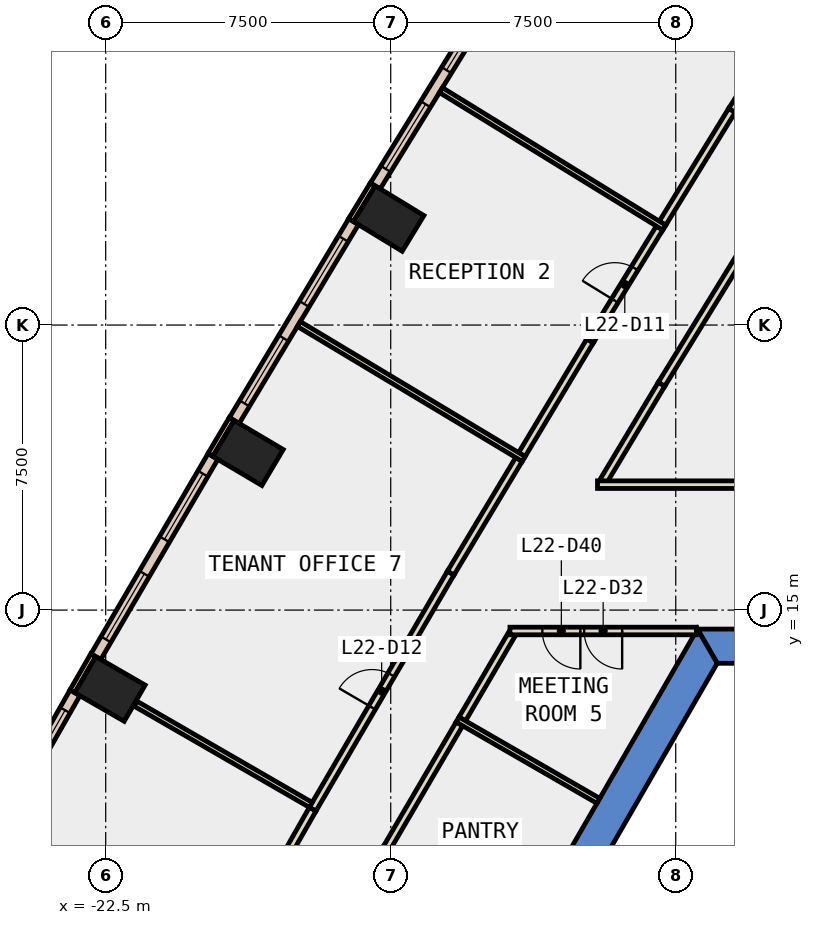
"""IFC4 building model, lengths in metres.
Left out: names, types, materials, properties, quantities, classifications, styles, units other than length and angle.
Written with IfcOpenShell. Run it as: python <this file> out.ifc"""

import sys

from ifc_helpers import new_model, si_unit, direction, frame, frame_2d, origin, origin_2d, place, context, subcontext, project, spatial, polyline, rectangle, outline, extrude, element, fill, save


model = new_model("IFC4")
c1 = context("Model", 3, precision=1e-05, world=origin(), true_north=direction((0.0, 1.0)))
c2 = subcontext(c1, "Body", "Model", "MODEL_VIEW")
j1 = project(units=[si_unit("LENGTHUNIT", "METRE"), si_unit("PLANEANGLEUNIT", "RADIAN")], contexts=[c1])
p1 = place(None, origin())
s1 = spatial("IfcSite", under=j1, at=p1, CompositionType="ELEMENT")
p2 = place(p1, origin())
s2 = spatial("IfcBuilding", under=s1, at=p2, CompositionType="ELEMENT")
p3 = place(p2, frame((0.0, 0.0, 103.4)))
s3 = spatial("IfcBuildingStorey", under=s2, at=p3, CompositionType="ELEMENT", Elevation=103.4)
for number, where, z_axis, x_axis in (
    (1, (-15.053, 25.302, -0.4), (0.0, 0.0, 1.0), (0.52, 0.854, 0.0)),
    (2, (-18.755, 19.134, -0.4), (0.0, 0.0, 1.0), (0.51, 0.86, 0.0)),
    (3, (-22.387, 12.925, -0.4), (0.0, 0.0, 1.0), (0.5, 0.866, 0.0)),
):
    element("IfcColumn", number, at=place(p3, frame(where, z_axis=z_axis, x_axis=x_axis)), inside=s3, PredefinedType="COLUMN", context=c2, shape_type="SweptSolid", body=[
        extrude(rectangle(XDim=1.1, YDim=1.5, at=origin_2d()), origin(), (0.0, 0.0, 1.0), 4.2),
    ])
p4 = place(p3, frame((0.0, 0.0, -0.4)))
e4 = element("IfcWall", 4, at=p4, inside=s3, PredefinedType="SHEAR", context=c2, shape_type="SweptSolid", body=[
    extrude(outline(polyline([(-4.55, 13.6), (-4.55, 14.5), (-6.928, 14.5), (-6.409, 13.6), (-4.55, 13.6)])), origin(), (0.0, 0.0, 1.0), 4.2),
])
p5 = place(p3, frame((0.0, 0.0, -0.4)))
e5 = element("IfcWall", 5, at=p5, inside=s3, PredefinedType="SHEAR", context=c2, shape_type="SweptSolid", body=[
    extrude(outline(polyline([(-12.267, 5.252), (-11.488, 4.802), (-6.409, 13.6), (-6.928, 14.5), (-12.267, 5.252)])), origin(), (0.0, 0.0, 1.0), 4.2),
])
p6 = place(p3, frame((-15.472, 26.201, 0.0), z_axis=(0.0, 0.0, 1.0), x_axis=(-0.519869515594, -0.854245682901, 0.0)))
e6 = element("IfcWall", 6, at=p6, inside=s3, PredefinedType="STANDARD", context=c2, shape_type="SweptSolid", body=[
    extrude(rectangle(XDim=1.1, YDim=0.15, at=frame_2d((0.55, 0.0))), origin(), (0.0, 0.0, 1.0), 3.8),
])
p7 = place(p3, frame((-19.184, 20.028, 0.0), z_axis=(0.0, 0.0, 1.0), x_axis=(-0.510082245696, -0.860125631885, 0.0)))
e7 = element("IfcWall", 7, at=p7, inside=s3, PredefinedType="STANDARD", context=c2, shape_type="SweptSolid", body=[
    extrude(rectangle(XDim=1.1, YDim=0.15, at=frame_2d((0.55, 0.0))), origin(), (0.0, 0.0, 1.0), 3.8),
])
p8 = place(p3, frame((-22.826, 13.814, 0.0), z_axis=(0.0, 0.0, 1.0), x_axis=(-0.499933745558, -0.866063652425, 0.0)))
e8 = element("IfcWall", 8, at=p8, inside=s3, PredefinedType="STANDARD", context=c2, shape_type="SweptSolid", body=[
    extrude(rectangle(XDim=1.1, YDim=0.15, at=frame_2d((0.55, 0.0))), origin(), (0.0, 0.0, 1.0), 3.8),
])
p9 = place(p3, frame((-12.207, 31.358, 0.0), z_axis=(0.0, 0.0, 1.0), x_axis=(-0.524121974895, -0.851643208998, 0.0)))
e9 = element("IfcWall", 9, at=p9, inside=s3, PredefinedType="STANDARD", context=c2, shape_type="SweptSolid", body=[
    extrude(rectangle(XDim=6.104, YDim=0.3, at=frame_2d((3.052, 0.0))), origin(), (0.0, 0.0, 1.0), 3.8),
])
p10 = place(p9, frame((0.526, 0.0, 0.9)))
e10 = element("IfcOpeningElement", 10, at=p10, cuts=e9, PredefinedType="OPENING", context=c2, shape_type="SweptSolid", body=[
    extrude(rectangle(XDim=2.0, YDim=2.6, at=frame_2d((1.0, 1.3))), frame((0.0, 0.16, 0.0), z_axis=(0.0, -1.0, 0.0), x_axis=(1.0, 0.0, 0.0)), (0.0, 0.0, 1.0), 0.32),
])
p11 = place(p9, frame((3.578, 0.0, 0.9)))
e11 = element("IfcOpeningElement", 11, at=p11, cuts=e9, PredefinedType="OPENING", context=c2, shape_type="SweptSolid", body=[
    extrude(rectangle(XDim=2.0, YDim=2.6, at=frame_2d((1.0, 1.3))), frame((0.0, 0.16, 0.0), z_axis=(0.0, -1.0, 0.0), x_axis=(1.0, 0.0, 0.0)), (0.0, 0.0, 1.0), 0.32),
])
p12 = place(p3, frame((-15.976, 25.221, 0.0), z_axis=(0.0, 0.0, 1.0), x_axis=(-0.514560454873, -0.857454102726, 0.0)))
e12 = element("IfcWall", 12, at=p12, inside=s3, PredefinedType="STANDARD", context=c2, shape_type="SweptSolid", body=[
    extrude(rectangle(XDim=6.104, YDim=0.3, at=frame_2d((3.052, 0.0))), origin(), (0.0, 0.0, 1.0), 3.8),
])
p13 = place(p12, frame((0.526, 0.0, 0.9)))
e13 = element("IfcOpeningElement", 13, at=p13, cuts=e12, PredefinedType="OPENING", context=c2, shape_type="SweptSolid", body=[
    extrude(rectangle(XDim=2.0, YDim=2.6, at=frame_2d((1.0, 1.3))), frame((0.0, 0.16, 0.0), z_axis=(0.0, -1.0, 0.0), x_axis=(1.0, 0.0, 0.0)), (0.0, 0.0, 1.0), 0.32),
])
p14 = place(p12, frame((3.578, 0.0, 0.9)))
e14 = element("IfcOpeningElement", 14, at=p14, cuts=e12, PredefinedType="OPENING", context=c2, shape_type="SweptSolid", body=[
    extrude(rectangle(XDim=2.0, YDim=2.6, at=frame_2d((1.0, 1.3))), frame((0.0, 0.16, 0.0), z_axis=(0.0, -1.0, 0.0), x_axis=(1.0, 0.0, 0.0)), (0.0, 0.0, 1.0), 0.32),
])
p15 = place(p3, frame((-19.677, 19.043, 0.0), z_axis=(0.0, 0.0, 1.0), x_axis=(-0.50490018297, -0.863177736759, 0.0)))
e15 = element("IfcWall", 15, at=p15, inside=s3, PredefinedType="STANDARD", context=c2, shape_type="SweptSolid", body=[
    extrude(rectangle(XDim=6.104, YDim=0.3, at=frame_2d((3.052, 0.0))), origin(), (0.0, 0.0, 1.0), 3.8),
])
p16 = place(p15, frame((0.526, 0.0, 0.9)))
e16 = element("IfcOpeningElement", 16, at=p16, cuts=e15, PredefinedType="OPENING", context=c2, shape_type="SweptSolid", body=[
    extrude(rectangle(XDim=2.0, YDim=2.6, at=frame_2d((1.0, 1.3))), frame((0.0, 0.16, 0.0), z_axis=(0.0, -1.0, 0.0), x_axis=(1.0, 0.0, 0.0)), (0.0, 0.0, 1.0), 0.32),
])
p17 = place(p15, frame((3.578, 0.0, 0.9)))
e17 = element("IfcOpeningElement", 17, at=p17, cuts=e15, PredefinedType="OPENING", context=c2, shape_type="SweptSolid", body=[
    extrude(rectangle(XDim=2.0, YDim=2.6, at=frame_2d((1.0, 1.3))), frame((0.0, 0.16, 0.0), z_axis=(0.0, -1.0, 0.0), x_axis=(1.0, 0.0, 0.0)), (0.0, 0.0, 1.0), 0.32),
])
p18 = place(p3, frame((-23.308, 12.823, 0.0), z_axis=(0.0, 0.0, 1.0), x_axis=(-0.495113375427, -0.868828375154, 0.0)))
e18 = element("IfcWall", 18, at=p18, inside=s3, PredefinedType="STANDARD", context=c2, shape_type="SweptSolid", body=[
    extrude(rectangle(XDim=6.104, YDim=0.3, at=frame_2d((3.052, 0.0))), origin(), (0.0, 0.0, 1.0), 3.8),
])
p19 = place(p18, frame((0.526, 0.0, 0.9)))
e19 = element("IfcOpeningElement", 19, at=p19, cuts=e18, PredefinedType="OPENING", context=c2, shape_type="SweptSolid", body=[
    extrude(rectangle(XDim=2.0, YDim=2.6, at=frame_2d((1.0, 1.3))), frame((0.0, 0.16, 0.0), z_axis=(0.0, -1.0, 0.0), x_axis=(1.0, 0.0, 0.0)), (0.0, 0.0, 1.0), 0.32),
])
p20 = place(p18, frame((3.578, 0.0, 0.9)))
e20 = element("IfcOpeningElement", 20, at=p20, cuts=e18, PredefinedType="OPENING", context=c2, shape_type="SweptSolid", body=[
    extrude(rectangle(XDim=2.0, YDim=2.6, at=frame_2d((1.0, 1.3))), frame((0.0, 0.16, 0.0), z_axis=(0.0, -1.0, 0.0), x_axis=(1.0, 0.0, 0.0)), (0.0, 0.0, 1.0), 0.32),
])
p21 = place(p3, frame((-11.814, 14.364, 0.0), z_axis=(0.0, 0.0, 1.0), x_axis=(-0.504658640018, -0.863318977583, 0.0)))
e21 = element("IfcWall", 21, at=p21, inside=s3, PredefinedType="PARTITIONING", context=c2, shape_type="SweptSolid", body=[
    extrude(rectangle(XDim=2.582, YDim=0.2, at=frame_2d((1.291, 0.0))), origin(), (0.0, 0.0, 1.0), 3.8),
])
p22 = place(p3, frame((-13.193, 12.005, 0.0), z_axis=(0.0, 0.0, 1.0), x_axis=(-0.50499711829, -0.863121028894, 0.0)))
e22 = element("IfcWall", 22, at=p22, inside=s3, PredefinedType="PARTITIONING", context=c2, shape_type="SweptSolid", body=[
    extrude(rectangle(XDim=3.8, YDim=0.2, at=frame_2d((1.9, 0.0))), origin(), (0.0, 0.0, 1.0), 3.8),
])
p23 = place(p3, frame((-4.154, 26.985, 0.0), z_axis=(0.0, 0.0, 1.0), x_axis=(-0.524183774504, -0.851605172921, 0.0)))
e23 = element("IfcWall", 23, at=p23, inside=s3, PredefinedType="PARTITIONING", context=c2, shape_type="SweptSolid", body=[
    extrude(rectangle(XDim=7.099, YDim=0.2, at=frame_2d((3.549, 0.0))), origin(), (0.0, 0.0, 1.0), 3.8),
])
p24 = place(p3, frame((-7.875, 20.94, 0.0), z_axis=(0.0, 0.0, 1.0), x_axis=(-0.514399309837, -0.857550785691, 0.0)))
e24 = element("IfcWall", 24, at=p24, inside=s3, PredefinedType="PARTITIONING", context=c2, shape_type="SweptSolid", body=[
    extrude(rectangle(XDim=2.978, YDim=0.2, at=frame_2d((1.489, 0.0))), origin(), (0.0, 0.0, 1.0), 3.8),
])
p25 = place(p3, frame((-7.848, 25.18, 0.0), z_axis=(0.0, 0.0, 1.0), x_axis=(0.524062258075, 0.851679957297, 0.0)))
e25 = element("IfcWall", 25, at=p25, inside=s3, PredefinedType="PARTITIONING", context=c2, shape_type="SweptSolid", body=[
    extrude(rectangle(XDim=3.486, YDim=0.2, at=frame_2d((1.743, 0.0))), origin(), (0.0, 0.0, 1.0), 3.8),
])
p26 = place(p3, frame((-6.021, 28.149, 0.0), z_axis=(0.0, 0.0, 1.0), x_axis=(0.533874165031, 0.845563939577, 0.0)))
e26 = element("IfcWall", 26, at=p26, inside=s3, PredefinedType="PARTITIONING", context=c2, shape_type="SweptSolid", body=[
    extrude(rectangle(XDim=6.571, YDim=0.2, at=frame_2d((3.286, 0.0))), origin(), (0.0, 0.0, 1.0), 3.8),
])
p27 = place(p26, frame((2.785, 0.0, 0.0)))
e27 = element("IfcOpeningElement", 27, at=p27, cuts=e26, PredefinedType="OPENING", context=c2, shape_type="SweptSolid", body=[
    extrude(rectangle(XDim=1.0, YDim=2.1, at=frame_2d((0.5, 1.05))), frame((0.0, 0.11, 0.0), z_axis=(0.0, -1.0, 0.0), x_axis=(1.0, 0.0, 0.0)), (0.0, 0.0, 1.0), 0.22),
])
p28 = place(p3, frame((-11.549, 19.092, 0.0), z_axis=(0.0, 0.0, 1.0), x_axis=(0.514536939864, 0.857468213705, 0.0)))
e28 = element("IfcWall", 28, at=p28, inside=s3, PredefinedType="PARTITIONING", context=c2, shape_type="SweptSolid", body=[
    extrude(rectangle(XDim=3.487, YDim=0.2, at=frame_2d((1.744, 0.0))), origin(), (0.0, 0.0, 1.0), 3.8),
])
p29 = place(p3, frame((-9.755, 22.082, 0.0), z_axis=(0.0, 0.0, 1.0), x_axis=(0.524140390501, 0.851631875311, 0.0)))
e29 = element("IfcWall", 29, at=p29, inside=s3, PredefinedType="PARTITIONING", context=c2, shape_type="SweptSolid", body=[
    extrude(rectangle(XDim=3.487, YDim=0.2, at=frame_2d((1.744, 0.0))), origin(), (0.0, 0.0, 1.0), 3.8),
])
p30 = place(p29, frame((1.244, 0.0, 0.0)))
e30 = element("IfcOpeningElement", 30, at=p30, cuts=e29, PredefinedType="OPENING", context=c2, shape_type="SweptSolid", body=[
    extrude(rectangle(XDim=1.0, YDim=2.1, at=frame_2d((0.5, 1.05))), frame((0.0, 0.11, 0.0), z_axis=(0.0, -1.0, 0.0), x_axis=(1.0, 0.0, 0.0)), (0.0, 0.0, 1.0), 0.22),
])
p31 = place(p3, frame((-17.055, 9.76, 0.0), z_axis=(0.0, 0.0, 1.0), x_axis=(0.504817517618, 0.863226085047, 0.0)))
e31 = element("IfcWall", 31, at=p31, inside=s3, PredefinedType="PARTITIONING", context=c2, shape_type="SweptSolid", body=[
    extrude(rectangle(XDim=7.199, YDim=0.2, at=frame_2d((3.599, 0.0))), origin(), (0.0, 0.0, 1.0), 3.8),
])
p32 = place(p31, frame((3.099, 0.0, 0.0)))
e32 = element("IfcOpeningElement", 32, at=p32, cuts=e31, PredefinedType="OPENING", context=c2, shape_type="SweptSolid", body=[
    extrude(rectangle(XDim=1.0, YDim=2.1, at=frame_2d((0.5, 1.05))), frame((0.0, 0.11, 0.0), z_axis=(0.0, -1.0, 0.0), x_axis=(1.0, 0.0, 0.0)), (0.0, 0.0, 1.0), 0.22),
])
p33 = place(p3, frame((-13.421, 15.974, 0.0), z_axis=(0.0, 0.0, 1.0), x_axis=(0.514691349792, 0.857375538751, 0.0)))
e33 = element("IfcWall", 33, at=p33, inside=s3, PredefinedType="PARTITIONING", context=c2, shape_type="SweptSolid", body=[
    extrude(rectangle(XDim=3.487, YDim=0.2, at=frame_2d((1.744, 0.0))), origin(), (0.0, 0.0, 1.0), 3.8),
])
p34 = place(p3, frame((-20.581, 3.571, 0.0), z_axis=(0.0, 0.0, 1.0), x_axis=(0.495138372197, 0.868814129937, 0.0)))
e34 = element("IfcWall", 34, at=p34, inside=s3, PredefinedType="PARTITIONING", context=c2, shape_type="SweptSolid", body=[
    extrude(rectangle(XDim=7.124, YDim=0.2, at=frame_2d((3.562, 0.0))), origin(), (0.0, 0.0, 1.0), 3.8),
])
p35 = place(p34, frame((3.137, 0.0, 0.0)))
e35 = element("IfcOpeningElement", 35, at=p35, cuts=e34, PredefinedType="OPENING", context=c2, shape_type="SweptSolid", body=[
    extrude(rectangle(XDim=1.0, YDim=2.1, at=frame_2d((0.5, 1.05))), frame((0.0, 0.11, 0.0), z_axis=(0.0, -1.0, 0.0), x_axis=(1.0, 0.0, 0.0)), (0.0, 0.0, 1.0), 0.22),
])
p36 = place(p3, frame((-9.537, 9.981, 0.0), z_axis=(0.0, 0.0, 1.0), x_axis=(-0.866007866579, 0.5000303741, 0.0)))
e36 = element("IfcWall", 36, at=p36, inside=s3, PredefinedType="PARTITIONING", context=c2, shape_type="SweptSolid", body=[
    extrude(rectangle(XDim=4.278, YDim=0.15, at=frame_2d((2.139, 0.0))), origin(), (0.0, 0.0, 1.0), 3.8),
])
p37 = place(p3, frame((-6.957, 14.45, 0.0), z_axis=(0.0, 0.0, 1.0), x_axis=(-1.0, 0.0, 0.0)))
e37 = element("IfcWall", 37, at=p37, inside=s3, PredefinedType="PARTITIONING", context=c2, shape_type="SweptSolid", body=[
    extrude(rectangle(XDim=4.906, YDim=0.2, at=frame_2d((2.453, 0.0))), origin(), (0.0, 0.0, 1.0), 3.8),
])
p38 = place(p37, frame((1.953, 0.0, 0.0)))
e38 = element("IfcOpeningElement", 38, at=p38, cuts=e37, PredefinedType="OPENING", context=c2, shape_type="SweptSolid", body=[
    extrude(rectangle(XDim=1.0, YDim=2.1, at=frame_2d((0.5, 1.05))), frame((0.0, 0.11, 0.0), z_axis=(0.0, -1.0, 0.0), x_axis=(1.0, 0.0, 0.0)), (0.0, 0.0, 1.0), 0.22),
])
p39 = place(p37, frame((3.053, 0.0, 0.0)))
e39 = element("IfcOpeningElement", 39, at=p39, cuts=e37, PredefinedType="OPENING", context=c2, shape_type="SweptSolid", body=[
    extrude(rectangle(XDim=1.0, YDim=2.1, at=frame_2d((0.5, 1.05))), frame((0.0, 0.11, 0.0), z_axis=(0.0, -1.0, 0.0), x_axis=(1.0, 0.0, 0.0)), (0.0, 0.0, 1.0), 0.22),
])
p40 = place(p3, frame((-9.559, 18.3, 0.0), z_axis=(0.0, 0.0, 1.0), x_axis=(1.0, 0.0, 0.0)))
e40 = element("IfcWall", 40, at=p40, inside=s3, PredefinedType="PARTITIONING", context=c2, shape_type="SweptSolid", body=[
    extrude(rectangle(XDim=9.159, YDim=0.2, at=frame_2d((4.58, 0.0))), origin(), (0.0, 0.0, 1.0), 3.8),
])
p41 = place(p3, frame((-7.802, 25.064, 0.0), z_axis=(0.0, 0.0, 1.0), x_axis=(-0.851596352662, 0.524198103901, 0.0)))
e41 = element("IfcWall", 41, at=p41, inside=s3, PredefinedType="PARTITIONING", context=c2, shape_type="SweptSolid", body=[
    extrude(rectangle(XDim=6.9, YDim=0.15, at=frame_2d((3.45, 0.0))), origin(), (0.0, 0.0, 1.0), 3.8),
])
p42 = place(p3, frame((-11.502, 18.977, 0.0), z_axis=(0.0, 0.0, 1.0), x_axis=(-0.857464824073, 0.514542588595, 0.0)))
e42 = element("IfcWall", 42, at=p42, inside=s3, PredefinedType="PARTITIONING", context=c2, shape_type="SweptSolid", body=[
    extrude(rectangle(XDim=6.899, YDim=0.15, at=frame_2d((3.45, 0.0))), origin(), (0.0, 0.0, 1.0), 3.8),
])
p43 = place(p3, frame((-17.104, 9.875, 0.0), z_axis=(0.0, 0.0, 1.0), x_axis=(-0.866024640963, 0.500001321243, 0.0)))
e43 = element("IfcWall", 43, at=p43, inside=s3, PredefinedType="PARTITIONING", context=c2, shape_type="SweptSolid", body=[
    extrude(rectangle(XDim=5.33, YDim=0.15, at=frame_2d((2.665, 0.0))), origin(), (0.0, 0.0, 1.0), 3.8),
])
p44 = place(p3, frame((-5.03, 9.388, 0.0), z_axis=(0.0, 0.0, 1.0), x_axis=(-0.499978703459, -0.866037698999, 0.0)))
e44 = element("IfcWall", 44, at=p44, inside=s3, PredefinedType="STANDARD", context=c2, shape_type="SweptSolid", body=[
    extrude(rectangle(XDim=6.9, YDim=0.2, at=frame_2d((3.45, 0.0))), origin(), (0.0, 0.0, 1.0), 3.8),
])
p45 = place(p10, origin())
e45 = element("IfcWindow", 45, at=p45, inside=s3, PartitioningType="SINGLE_PANEL", PredefinedType="WINDOW", context=c2, shape_type="SweptSolid", body=[
    extrude(rectangle(XDim=2.0, YDim=2.6, at=frame_2d((1.0, 1.3))), frame((0.0, 0.03, 0.0), z_axis=(0.0, -1.0, 0.0), x_axis=(1.0, 0.0, 0.0)), (0.0, 0.0, 1.0), 0.06),
])
fill(e10, e45)
p46 = place(p11, origin())
e46 = element("IfcWindow", 46, at=p46, inside=s3, PartitioningType="SINGLE_PANEL", PredefinedType="WINDOW", context=c2, shape_type="SweptSolid", body=[
    extrude(rectangle(XDim=2.0, YDim=2.6, at=frame_2d((1.0, 1.3))), frame((0.0, 0.03, 0.0), z_axis=(0.0, -1.0, 0.0), x_axis=(1.0, 0.0, 0.0)), (0.0, 0.0, 1.0), 0.06),
])
fill(e11, e46)
p47 = place(p13, origin())
e47 = element("IfcWindow", 47, at=p47, inside=s3, PartitioningType="SINGLE_PANEL", PredefinedType="WINDOW", context=c2, shape_type="SweptSolid", body=[
    extrude(rectangle(XDim=2.0, YDim=2.6, at=frame_2d((1.0, 1.3))), frame((0.0, 0.03, 0.0), z_axis=(0.0, -1.0, 0.0), x_axis=(1.0, 0.0, 0.0)), (0.0, 0.0, 1.0), 0.06),
])
fill(e13, e47)
p48 = place(p14, origin())
e48 = element("IfcWindow", 48, at=p48, inside=s3, PartitioningType="SINGLE_PANEL", PredefinedType="WINDOW", context=c2, shape_type="SweptSolid", body=[
    extrude(rectangle(XDim=2.0, YDim=2.6, at=frame_2d((1.0, 1.3))), frame((0.0, 0.03, 0.0), z_axis=(0.0, -1.0, 0.0), x_axis=(1.0, 0.0, 0.0)), (0.0, 0.0, 1.0), 0.06),
])
fill(e14, e48)
p49 = place(p16, origin())
e49 = element("IfcWindow", 49, at=p49, inside=s3, PartitioningType="SINGLE_PANEL", PredefinedType="WINDOW", context=c2, shape_type="SweptSolid", body=[
    extrude(rectangle(XDim=2.0, YDim=2.6, at=frame_2d((1.0, 1.3))), frame((0.0, 0.03, 0.0), z_axis=(0.0, -1.0, 0.0), x_axis=(1.0, 0.0, 0.0)), (0.0, 0.0, 1.0), 0.06),
])
fill(e16, e49)
p50 = place(p17, origin())
e50 = element("IfcWindow", 50, at=p50, inside=s3, PartitioningType="SINGLE_PANEL", PredefinedType="WINDOW", context=c2, shape_type="SweptSolid", body=[
    extrude(rectangle(XDim=2.0, YDim=2.6, at=frame_2d((1.0, 1.3))), frame((0.0, 0.03, 0.0), z_axis=(0.0, -1.0, 0.0), x_axis=(1.0, 0.0, 0.0)), (0.0, 0.0, 1.0), 0.06),
])
fill(e17, e50)
p51 = place(p19, origin())
e51 = element("IfcWindow", 51, at=p51, inside=s3, PartitioningType="SINGLE_PANEL", PredefinedType="WINDOW", context=c2, shape_type="SweptSolid", body=[
    extrude(rectangle(XDim=2.0, YDim=2.6, at=frame_2d((1.0, 1.3))), frame((0.0, 0.03, 0.0), z_axis=(0.0, -1.0, 0.0), x_axis=(1.0, 0.0, 0.0)), (0.0, 0.0, 1.0), 0.06),
])
fill(e19, e51)
p52 = place(p30, origin())
e52 = element("IfcDoor", 52, at=p52, inside=s3, OperationType="SINGLE_SWING_LEFT", PredefinedType="DOOR", context=c2, shape_type="SweptSolid", body=[
    extrude(rectangle(XDim=1.0, YDim=2.1, at=frame_2d((0.5, 1.05))), frame((0.0, 0.025, 0.0), z_axis=(0.0, -1.0, 0.0), x_axis=(1.0, 0.0, 0.0)), (0.0, 0.0, 1.0), 0.05),
])
fill(e30, e52)
p53 = place(p32, origin())
e53 = element("IfcDoor", 53, at=p53, inside=s3, OperationType="SINGLE_SWING_LEFT", PredefinedType="DOOR", context=c2, shape_type="SweptSolid", body=[
    extrude(rectangle(XDim=1.0, YDim=2.1, at=frame_2d((0.5, 1.05))), frame((0.0, 0.025, 0.0), z_axis=(0.0, -1.0, 0.0), x_axis=(1.0, 0.0, 0.0)), (0.0, 0.0, 1.0), 0.05),
])
fill(e32, e53)
p54 = place(p38, origin())
e54 = element("IfcDoor", 54, at=p54, inside=s3, OperationType="SINGLE_SWING_LEFT", PredefinedType="DOOR", context=c2, shape_type="SweptSolid", body=[
    extrude(rectangle(XDim=1.0, YDim=2.1, at=frame_2d((0.5, 1.05))), frame((0.0, 0.025, 0.0), z_axis=(0.0, -1.0, 0.0), x_axis=(1.0, 0.0, 0.0)), (0.0, 0.0, 1.0), 0.05),
])
fill(e38, e54)
p55 = place(p39, origin())
e55 = element("IfcDoor", 55, at=p55, inside=s3, OperationType="SINGLE_SWING_RIGHT", PredefinedType="DOOR", context=c2, shape_type="SweptSolid", body=[
    extrude(rectangle(XDim=1.0, YDim=2.1, at=frame_2d((0.5, 1.05))), frame((0.0, 0.025, 0.0), z_axis=(0.0, -1.0, 0.0), x_axis=(1.0, 0.0, 0.0)), (0.0, 0.0, 1.0), 0.05),
])
fill(e39, e55)
save(model, sys.argv[1])
